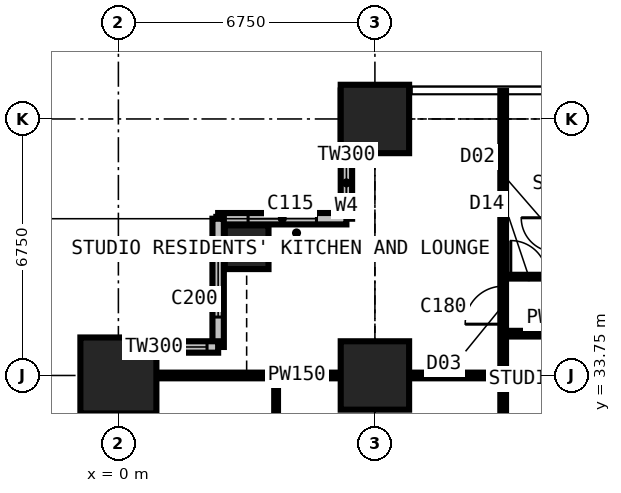
"""IFC4 building model, lengths in metres.
Left out: names, types, materials, properties, quantities, classifications, styles, units other than length and angle.
Written with IfcOpenShell. Run it as: python <this file> out.ifc"""

import sys

from ifc_helpers import new_model, si_unit, direction, frame, frame_2d, origin, origin_2d, place, context, subcontext, project, spatial, rectangle, extrude, element, fill, save


model = new_model("IFC4")
c1 = context("Model", 3, precision=1e-05, world=origin(), true_north=direction((0.0, 1.0)))
c2 = subcontext(c1, "Body", "Model", "MODEL_VIEW")
j1 = project(units=[si_unit("LENGTHUNIT", "METRE"), si_unit("PLANEANGLEUNIT", "RADIAN")], contexts=[c1])
p1 = place(None, origin())
s1 = spatial("IfcSite", under=j1, at=p1, CompositionType="ELEMENT")
p2 = place(p1, origin())
s2 = spatial("IfcBuilding", under=s1, at=p2, CompositionType="ELEMENT")
p3 = place(p2, frame((0.0, 0.0, 72.0)))
s3 = spatial("IfcBuildingStorey", under=s2, at=p3, CompositionType="ELEMENT", Elevation=72.0)
p4 = place(p3, frame((0.0, 33.75, 0.0), z_axis=(0.0, 0.0, 1.0), x_axis=(1.0, 0.0, 0.0)))
e1 = element("IfcColumn", 1, at=p4, inside=s3, PredefinedType="COLUMN", context=c2, shape_type="SweptSolid", body=[
    extrude(rectangle(XDim=2.0, YDim=2.0, at=origin_2d()), origin(), (0.0, 0.0, 1.0), 3.6),
])
p5 = place(p3, frame((3.375, 37.125, 0.0), z_axis=(0.0, 0.0, 1.0), x_axis=(1.0, 0.0, 0.0)))
e2 = element("IfcColumn", 2, at=p5, inside=s3, PredefinedType="COLUMN", context=c2, shape_type="SweptSolid", body=[
    extrude(rectangle(XDim=1.15, YDim=1.15, at=origin_2d()), origin(), (0.0, 0.0, 1.0), 3.6),
])
for number, where, z_axis, x_axis in (
    (3, (6.75, 33.75, 0.0), (0.0, 0.0, 1.0), (1.0, 0.0, 0.0)),
    (4, (6.75, 40.5, 0.0), (0.0, 0.0, 1.0), (1.0, 0.0, 0.0)),
):
    element("IfcColumn", number, at=place(p3, frame(where, z_axis=z_axis, x_axis=x_axis)), inside=s3, PredefinedType="COLUMN", context=c2, shape_type="SweptSolid", body=[
        extrude(rectangle(XDim=1.8, YDim=1.8, at=origin_2d()), origin(), (0.0, 0.0, 1.0), 3.6),
    ])
p6 = place(p3, frame((6.0, 41.25, 0.0), z_axis=(0.0, 0.0, 1.0), x_axis=(0.0, -1.0, 0.0)))
e5 = element("IfcWall", 5, at=p6, inside=s3, PredefinedType="SOLIDWALL", context=c2, shape_type="SweptSolid", body=[
    extrude(rectangle(XDim=3.375, YDim=0.3, at=frame_2d((1.688, 0.0))), origin(), (0.0, 0.0, 1.0), 3.3),
])
p7 = place(p6, frame((1.833, 0.0, 0.9)))
e6 = element("IfcOpeningElement", 6, at=p7, cuts=e5, PredefinedType="OPENING", context=c2, shape_type="SweptSolid", body=[
    extrude(rectangle(XDim=1.2, YDim=1.8, at=frame_2d((0.6, 0.9))), frame((0.0, 0.16, 0.0), z_axis=(0.0, -1.0, 0.0), x_axis=(1.0, 0.0, 0.0)), (0.0, 0.0, 1.0), 0.32),
])
p8 = place(p3, frame((6.0, 37.875, 0.0), z_axis=(0.0, 0.0, 1.0), x_axis=(-1.0, 0.0, 0.0)))
e7 = element("IfcWall", 7, at=p8, inside=s3, PredefinedType="SOLIDWALL", context=c2, shape_type="SweptSolid", body=[
    extrude(rectangle(XDim=3.375, YDim=0.3, at=frame_2d((1.688, 0.0))), origin(), (0.0, 0.0, 1.0), 3.3),
])
p9 = place(p8, frame((0.788, 0.0, 0.6)))
e8 = element("IfcOpeningElement", 8, at=p9, cuts=e7, PredefinedType="OPENING", context=c2, shape_type="SweptSolid", body=[
    extrude(rectangle(XDim=1.8, YDim=2.1, at=frame_2d((0.9, 1.05))), frame((0.0, 0.16, 0.0), z_axis=(0.0, -1.0, 0.0), x_axis=(1.0, 0.0, 0.0)), (0.0, 0.0, 1.0), 0.32),
])
p10 = place(p3, frame((2.625, 37.875, 0.0), z_axis=(0.0, 0.0, 1.0), x_axis=(0.0, -1.0, 0.0)))
e9 = element("IfcWall", 9, at=p10, inside=s3, PredefinedType="SOLIDWALL", context=c2, shape_type="SweptSolid", body=[
    extrude(rectangle(XDim=3.375, YDim=0.3, at=frame_2d((1.688, 0.0))), origin(), (0.0, 0.0, 1.0), 3.3),
])
p11 = place(p10, frame((0.788, 0.0, 0.6)))
e10 = element("IfcOpeningElement", 10, at=p11, cuts=e9, PredefinedType="OPENING", context=c2, shape_type="SweptSolid", body=[
    extrude(rectangle(XDim=1.8, YDim=2.1, at=frame_2d((0.9, 1.05))), frame((0.0, 0.16, 0.0), z_axis=(0.0, -1.0, 0.0), x_axis=(1.0, 0.0, 0.0)), (0.0, 0.0, 1.0), 0.32),
])
p12 = place(p3, frame((2.625, 34.5, 0.0), z_axis=(0.0, 0.0, 1.0), x_axis=(-1.0, 0.0, 0.0)))
e11 = element("IfcWall", 11, at=p12, inside=s3, PredefinedType="SOLIDWALL", context=c2, shape_type="SweptSolid", body=[
    extrude(rectangle(XDim=3.375, YDim=0.3, at=frame_2d((1.688, 0.0))), origin(), (0.0, 0.0, 1.0), 3.3),
])
p13 = place(p12, frame((0.292, 0.0, 0.9)))
e12 = element("IfcOpeningElement", 12, at=p13, cuts=e11, PredefinedType="OPENING", context=c2, shape_type="SweptSolid", body=[
    extrude(rectangle(XDim=1.2, YDim=1.8, at=frame_2d((0.6, 0.9))), frame((0.0, 0.16, 0.0), z_axis=(0.0, -1.0, 0.0), x_axis=(1.0, 0.0, 0.0)), (0.0, 0.0, 1.0), 0.32),
])
p14 = place(p3, frame((-0.734, 33.75, 0.0), z_axis=(0.0, 0.0, 1.0), x_axis=(1.0, 0.0, 0.0)))
e13 = element("IfcWall", 13, at=p14, inside=s3, PredefinedType="PARTITIONING", context=c2, shape_type="SweptSolid", body=[
    extrude(rectangle(XDim=10.859, YDim=0.15, at=frame_2d((5.429, 0.0))), origin(), (0.0, 0.0, 1.0), 2.802),
])
p15 = place(p3, frame((4.15, 10.125, 0.0), z_axis=(0.0, 0.0, 1.0), x_axis=(0.0, 1.0, 0.0)))
e14 = element("IfcWall", 14, at=p15, inside=s3, PredefinedType="PARTITIONING", context=c2, shape_type="SweptSolid", body=[
    extrude(rectangle(XDim=23.625, YDim=0.1, at=frame_2d((11.812, 0.0))), origin(), (0.0, 0.0, 1.0), 3.3),
])
p16 = place(p15, frame((7.575, 0.0, 0.0)))
e15 = element("IfcOpeningElement", 15, at=p16, cuts=e14, PredefinedType="OPENING", context=c2, shape_type="SweptSolid", body=[
    extrude(rectangle(XDim=0.95, YDim=2.2, at=frame_2d((0.475, 1.1))), frame((0.0, 0.06, 0.0), z_axis=(0.0, -1.0, 0.0), x_axis=(1.0, 0.0, 0.0)), (0.0, 0.0, 1.0), 0.12),
])
p17 = place(p15, frame((14.325, 0.0, 0.0)))
e16 = element("IfcOpeningElement", 16, at=p17, cuts=e14, PredefinedType="OPENING", context=c2, shape_type="SweptSolid", body=[
    extrude(rectangle(XDim=0.95, YDim=2.2, at=frame_2d((0.475, 1.1))), frame((0.0, 0.06, 0.0), z_axis=(0.0, -1.0, 0.0), x_axis=(1.0, 0.0, 0.0)), (0.0, 0.0, 1.0), 0.12),
])
p18 = place(p15, frame((21.075, 0.0, 0.0)))
e17 = element("IfcOpeningElement", 17, at=p18, cuts=e14, PredefinedType="OPENING", context=c2, shape_type="SweptSolid", body=[
    extrude(rectangle(XDim=0.95, YDim=2.2, at=frame_2d((0.475, 1.1))), frame((0.0, 0.06, 0.0), z_axis=(0.0, -1.0, 0.0), x_axis=(1.0, 0.0, 0.0)), (0.0, 0.0, 1.0), 0.12),
])
p19 = place(p15, frame((0.2, 0.0, 0.0)))
e18 = element("IfcOpeningElement", 18, at=p19, cuts=e14, PredefinedType="OPENING", context=c2, shape_type="SweptSolid", body=[
    extrude(rectangle(XDim=0.95, YDim=2.2, at=frame_2d((0.475, 1.1))), frame((0.0, 0.06, 0.0), z_axis=(0.0, -1.0, 0.0), x_axis=(1.0, 0.0, 0.0)), (0.0, 0.0, 1.0), 0.12),
])
p20 = place(p3, frame((10.125, 30.375, 0.0), z_axis=(0.0, 0.0, 1.0), x_axis=(0.0, 1.0, 0.0)))
e19 = element("IfcWall", 19, at=p20, inside=s3, PredefinedType="PARTITIONING", context=c2, shape_type="SweptSolid", body=[
    extrude(rectangle(XDim=10.859, YDim=0.15, at=frame_2d((5.429, 0.0))), origin(), (0.0, 0.0, 1.0), 3.3),
])
p21 = place(p20, frame((4.725, 0.0, 0.0)))
e20 = element("IfcOpeningElement", 20, at=p21, cuts=e19, PredefinedType="OPENING", context=c2, shape_type="SweptSolid", body=[
    extrude(rectangle(XDim=1.0, YDim=2.2, at=frame_2d((0.5, 1.1))), frame((0.0, 0.085, 0.0), z_axis=(0.0, -1.0, 0.0), x_axis=(1.0, 0.0, 0.0)), (0.0, 0.0, 1.0), 0.17),
])
p22 = place(p3, frame((10.125, 34.85, 0.0), z_axis=(0.0, 0.0, 1.0), x_axis=(1.0, 0.0, 0.0)))
e21 = element("IfcWall", 21, at=p22, inside=s3, PredefinedType="PARTITIONING", context=c2, shape_type="SweptSolid", body=[
    extrude(rectangle(XDim=10.762, YDim=0.15, at=frame_2d((5.381, 0.0))), origin(), (0.0, 0.0, 1.0), 3.3),
])
p23 = place(p22, frame((4.9, 0.0, 0.0)))
e22 = element("IfcOpeningElement", 22, at=p23, cuts=e21, PredefinedType="OPENING", context=c2, shape_type="SweptSolid", body=[
    extrude(rectangle(XDim=0.95, YDim=2.2, at=frame_2d((0.475, 1.1))), frame((0.0, 0.085, 0.0), z_axis=(0.0, -1.0, 0.0), x_axis=(1.0, 0.0, 0.0)), (0.0, 0.0, 1.0), 0.17),
])
p24 = place(p3, frame((10.125, 36.35, 0.0), z_axis=(0.0, 0.0, 1.0), x_axis=(1.0, 0.0, 0.0)))
e23 = element("IfcWall", 23, at=p24, inside=s3, PredefinedType="PARTITIONING", context=c2, shape_type="SweptSolid", body=[
    extrude(rectangle(XDim=23.625, YDim=0.1, at=frame_2d((11.812, 0.0))), origin(), (0.0, 0.0, 1.0), 3.3),
])
p25 = place(p24, frame((21.45, 0.0, 0.0)))
e24 = element("IfcOpeningElement", 24, at=p25, cuts=e23, PredefinedType="OPENING", context=c2, shape_type="SweptSolid", body=[
    extrude(rectangle(XDim=1.0, YDim=2.2, at=frame_2d((0.5, 1.1))), frame((0.0, 0.06, 0.0), z_axis=(0.0, -1.0, 0.0), x_axis=(1.0, 0.0, 0.0)), (0.0, 0.0, 1.0), 0.12),
])
p26 = place(p24, frame((17.125, 0.0, 0.0)))
e25 = element("IfcOpeningElement", 25, at=p26, cuts=e23, PredefinedType="OPENING", context=c2, shape_type="SweptSolid", body=[
    extrude(rectangle(XDim=0.95, YDim=2.2, at=frame_2d((0.475, 1.1))), frame((0.0, 0.06, 0.0), z_axis=(0.0, -1.0, 0.0), x_axis=(1.0, 0.0, 0.0)), (0.0, 0.0, 1.0), 0.12),
])
p27 = place(p24, frame((13.7, 0.0, 0.0)))
e26 = element("IfcOpeningElement", 26, at=p27, cuts=e23, PredefinedType="OPENING", context=c2, shape_type="SweptSolid", body=[
    extrude(rectangle(XDim=0.95, YDim=2.2, at=frame_2d((0.475, 1.1))), frame((0.0, 0.06, 0.0), z_axis=(0.0, -1.0, 0.0), x_axis=(1.0, 0.0, 0.0)), (0.0, 0.0, 1.0), 0.12),
])
p28 = place(p24, frame((0.2, 0.0, 0.0)))
e27 = element("IfcOpeningElement", 27, at=p28, cuts=e23, PredefinedType="OPENING", context=c2, shape_type="SweptSolid", body=[
    extrude(rectangle(XDim=0.95, YDim=2.2, at=frame_2d((0.475, 1.1))), frame((0.0, 0.06, 0.0), z_axis=(0.0, -1.0, 0.0), x_axis=(1.0, 0.0, 0.0)), (0.0, 0.0, 1.0), 0.12),
])
p29 = place(p24, frame((3.625, 0.0, 0.0)))
e28 = element("IfcOpeningElement", 28, at=p29, cuts=e23, PredefinedType="OPENING", context=c2, shape_type="SweptSolid", body=[
    extrude(rectangle(XDim=0.95, YDim=2.2, at=frame_2d((0.475, 1.1))), frame((0.0, 0.06, 0.0), z_axis=(0.0, -1.0, 0.0), x_axis=(1.0, 0.0, 0.0)), (0.0, 0.0, 1.0), 0.12),
])
p30 = place(p24, frame((7.0, 0.0, 0.0)))
e29 = element("IfcOpeningElement", 29, at=p30, cuts=e23, PredefinedType="OPENING", context=c2, shape_type="SweptSolid", body=[
    extrude(rectangle(XDim=0.95, YDim=2.2, at=frame_2d((0.475, 1.1))), frame((0.0, 0.06, 0.0), z_axis=(0.0, -1.0, 0.0), x_axis=(1.0, 0.0, 0.0)), (0.0, 0.0, 1.0), 0.12),
])
p31 = place(p24, frame((10.375, 0.0, 0.0)))
e30 = element("IfcOpeningElement", 30, at=p31, cuts=e23, PredefinedType="OPENING", context=c2, shape_type="SweptSolid", body=[
    extrude(rectangle(XDim=0.95, YDim=2.2, at=frame_2d((0.475, 1.1))), frame((0.0, 0.06, 0.0), z_axis=(0.0, -1.0, 0.0), x_axis=(1.0, 0.0, 0.0)), (0.0, 0.0, 1.0), 0.12),
])
p32 = place(p7, origin())
e31 = element("IfcWindow", 31, at=p32, inside=s3, PartitioningType="SINGLE_PANEL", PredefinedType="WINDOW", context=c2, shape_type="SweptSolid", body=[
    extrude(rectangle(XDim=1.2, YDim=1.8, at=frame_2d((0.6, 0.9))), frame((0.0, 0.03, 0.0), z_axis=(0.0, -1.0, 0.0), x_axis=(1.0, 0.0, 0.0)), (0.0, 0.0, 1.0), 0.06),
])
fill(e6, e31)
p33 = place(p9, origin())
e32 = element("IfcWindow", 32, at=p33, inside=s3, PartitioningType="SINGLE_PANEL", PredefinedType="WINDOW", context=c2, shape_type="SweptSolid", body=[
    extrude(rectangle(XDim=1.8, YDim=2.1, at=frame_2d((0.9, 1.05))), frame((0.0, 0.03, 0.0), z_axis=(0.0, -1.0, 0.0), x_axis=(1.0, 0.0, 0.0)), (0.0, 0.0, 1.0), 0.06),
])
fill(e8, e32)
p34 = place(p11, origin())
e33 = element("IfcWindow", 33, at=p34, inside=s3, PartitioningType="SINGLE_PANEL", PredefinedType="WINDOW", context=c2, shape_type="SweptSolid", body=[
    extrude(rectangle(XDim=1.8, YDim=2.1, at=frame_2d((0.9, 1.05))), frame((0.0, 0.03, 0.0), z_axis=(0.0, -1.0, 0.0), x_axis=(1.0, 0.0, 0.0)), (0.0, 0.0, 1.0), 0.06),
])
fill(e10, e33)
p35 = place(p13, origin())
e34 = element("IfcWindow", 34, at=p35, inside=s3, PartitioningType="SINGLE_PANEL", PredefinedType="WINDOW", context=c2, shape_type="SweptSolid", body=[
    extrude(rectangle(XDim=1.2, YDim=1.8, at=frame_2d((0.6, 0.9))), frame((0.0, 0.03, 0.0), z_axis=(0.0, -1.0, 0.0), x_axis=(1.0, 0.0, 0.0)), (0.0, 0.0, 1.0), 0.06),
])
fill(e12, e34)
p36 = place(p28, origin())
e35 = element("IfcDoor", 35, at=p36, inside=s3, OperationType="SINGLE_SWING_LEFT", PredefinedType="DOOR", context=c2, shape_type="SweptSolid", body=[
    extrude(rectangle(XDim=0.95, YDim=2.2, at=frame_2d((0.475, 1.1))), frame((0.0, 0.025, 0.0), z_axis=(0.0, -1.0, 0.0), x_axis=(1.0, 0.0, 0.0)), (0.0, 0.0, 1.0), 0.05),
])
fill(e27, e35)
p37 = place(p21, origin())
e36 = element("IfcDoor", 36, at=p37, inside=s3, OperationType="SINGLE_SWING_LEFT", PredefinedType="DOOR", context=c2, shape_type="SweptSolid", body=[
    extrude(rectangle(XDim=1.0, YDim=2.2, at=frame_2d((0.5, 1.1))), frame((0.0, 0.025, 0.0), z_axis=(0.0, -1.0, 0.0), x_axis=(1.0, 0.0, 0.0)), (0.0, 0.0, 1.0), 0.05),
])
fill(e20, e36)
save(model, sys.argv[1])
